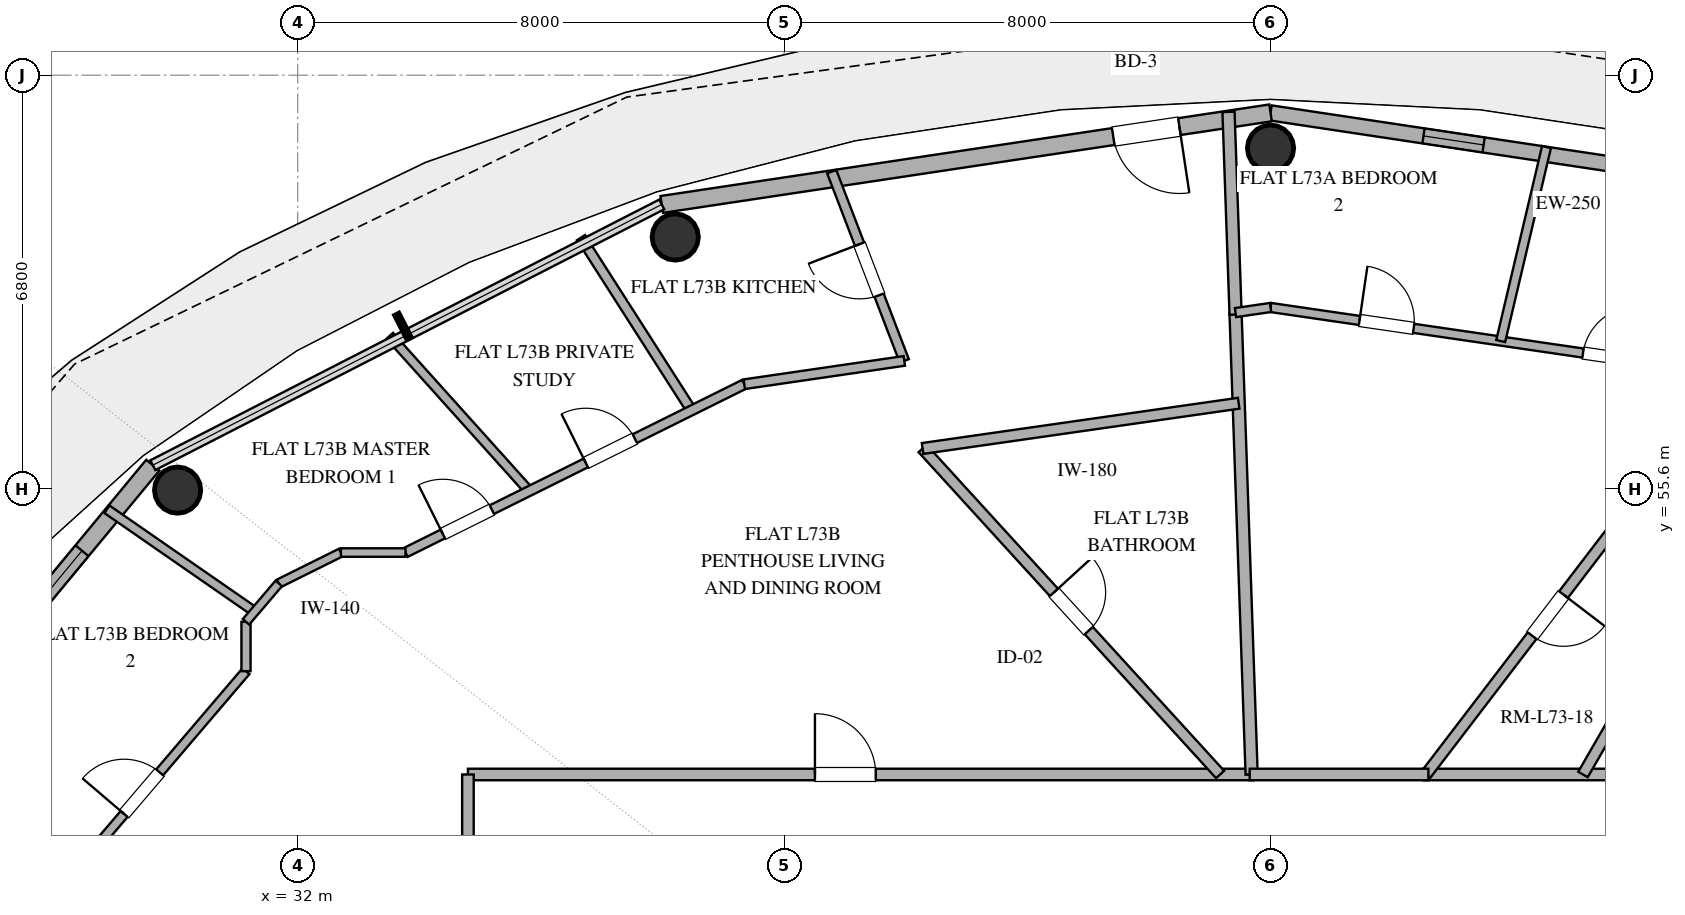
"""IFC4 building model, lengths in metres.
Left out: names, types, materials, properties, quantities, classifications, styles, units other than length and angle.
Written with IfcOpenShell. Run it as: python <this file> out.ifc"""

import sys

from ifc_helpers import new_model, si_unit, direction, frame, frame_2d, origin, origin_2d, place, context, subcontext, project, spatial, rectangle, hollow_circle, extrude, element, fill, save


model = new_model("IFC4")
c1 = context("Model", 3, precision=1e-05, world=origin(), true_north=direction((0.0, 1.0)))
c2 = subcontext(c1, "Body", "Model", "MODEL_VIEW")
j1 = project(units=[si_unit("LENGTHUNIT", "METRE"), si_unit("PLANEANGLEUNIT", "RADIAN")], contexts=[c1])
p1 = place(None, origin())
s1 = spatial("IfcSite", under=j1, at=p1, CompositionType="ELEMENT")
p2 = place(p1, origin())
s2 = spatial("IfcBuilding", under=s1, at=p2, CompositionType="ELEMENT")
p3 = place(p2, frame((0.0, 0.0, 283.8)))
s3 = spatial("IfcBuildingStorey", under=s2, at=p3, CompositionType="ELEMENT", Elevation=283.8)
for number, where, z_axis, x_axis in (
    (1, (48.0, 61.2, 0.0), (0.0, 0.0, 1.0), (1.0, 0.0, 0.0)),
    (2, (38.209, 59.739, 0.0), (0.0, 0.0, 1.0), (1.0, 0.0, 0.0)),
    (3, (30.025, 55.576, 0.0), (0.0, 0.0, 1.0), (1.0, 0.0, 0.0)),
):
    element("IfcColumn", number, at=place(p3, frame(where, z_axis=z_axis, x_axis=x_axis)), inside=s3, PredefinedType="COLUMN", context=c2, shape_type="SweptSolid", body=[
        extrude(hollow_circle(Radius=0.381, WallThickness=0.025, at=origin_2d()), origin(), (0.0, 0.0, 1.0), 3.37),
    ])
p4 = place(p3, frame((58.013, 60.274, 0.0), z_axis=(0.0, 0.0, 1.0), x_axis=(-0.988882522213, 0.148698881169, 0.0)))
e4 = element("IfcWall", 4, at=p4, inside=s3, PredefinedType="SOLIDWALL", context=c2, shape_type="SweptSolid", body=[
    extrude(rectangle(XDim=10.125, YDim=0.25, at=frame_2d((5.062, 0.0))), origin(), (0.0, 0.0, 1.0), 3.37),
])
p5 = place(p4, frame((2.134, 0.0, 0.35)))
e5 = element("IfcOpeningElement", 5, at=p5, cuts=e4, PredefinedType="OPENING", context=c2, shape_type="SweptSolid", body=[
    extrude(rectangle(XDim=1.0, YDim=1.05, at=frame_2d((0.5, 0.525))), frame((0.0, 0.135, 0.0), z_axis=(0.0, -1.0, 0.0), x_axis=(1.0, 0.0, 0.0)), (0.0, 0.0, 1.0), 0.27),
])
p6 = place(p4, frame((6.582, 0.0, 1.42)))
e6 = element("IfcOpeningElement", 6, at=p6, cuts=e4, PredefinedType="OPENING", context=c2, shape_type="SweptSolid", body=[
    extrude(rectangle(XDim=1.0, YDim=1.05, at=frame_2d((0.5, 0.525))), frame((0.0, 0.135, 0.0), z_axis=(0.0, -1.0, 0.0), x_axis=(1.0, 0.0, 0.0)), (0.0, 0.0, 1.0), 0.27),
])
p7 = place(p3, frame((48.0, 61.78, 0.0), z_axis=(0.0, 0.0, 1.0), x_axis=(-0.988882522213, -0.148698881169, 0.0)))
e7 = element("IfcWall", 7, at=p7, inside=s3, PredefinedType="SOLIDWALL", context=c2, shape_type="SweptSolid", body=[
    extrude(rectangle(XDim=10.125, YDim=0.28, at=frame_2d((5.062, 0.0))), origin(), (0.0, 0.0, 1.0), 3.37),
])
p8 = place(p7, frame((1.516, 0.0, 0.0)))
e8 = element("IfcOpeningElement", 8, at=p8, cuts=e7, PredefinedType="OPENING", context=c2, shape_type="SweptSolid", body=[
    extrude(rectangle(XDim=1.1, YDim=2.25, at=frame_2d((0.55, 1.125))), frame((0.0, 0.15, 0.0), z_axis=(0.0, -1.0, 0.0), x_axis=(1.0, 0.0, 0.0)), (0.0, 0.0, 1.0), 0.3),
])
p9 = place(p3, frame((29.617, 55.987, 0.0), z_axis=(0.0, 0.0, 1.0), x_axis=(-0.63761509934, -0.770355103243, 0.0)))
e9 = element("IfcWall", 9, at=p9, inside=s3, PredefinedType="SOLIDWALL", context=c2, shape_type="SweptSolid", body=[
    extrude(rectangle(XDim=8.33, YDim=0.28, at=frame_2d((4.165, 0.0))), origin(), (0.0, 0.0, 1.0), 3.37),
])
p10 = place(p9, frame((1.826, 0.0, 0.85)))
e10 = element("IfcOpeningElement", 10, at=p10, cuts=e9, PredefinedType="OPENING", context=c2, shape_type="SweptSolid", body=[
    extrude(rectangle(XDim=2.1, YDim=2.2, at=frame_2d((1.05, 1.1))), frame((0.0, 0.15, 0.0), z_axis=(0.0, -1.0, 0.0), x_axis=(1.0, 0.0, 0.0)), (0.0, 0.0, 1.0), 0.3),
])
p11 = place(p9, frame((4.296, 0.0, 0.85)))
e11 = element("IfcOpeningElement", 11, at=p11, cuts=e9, PredefinedType="OPENING", context=c2, shape_type="SweptSolid", body=[
    extrude(rectangle(XDim=2.1, YDim=2.2, at=frame_2d((1.05, 1.1))), frame((0.0, 0.15, 0.0), z_axis=(0.0, -1.0, 0.0), x_axis=(1.0, 0.0, 0.0)), (0.0, 0.0, 1.0), 0.3),
])
p12 = place(p3, frame((34.8, 50.9, 0.0), z_axis=(0.0, 0.0, 1.0), x_axis=(1.0, 0.0, 0.0)))
e12 = element("IfcWall", 12, at=p12, inside=s3, PredefinedType="PARTITIONING", context=c2, shape_type="SweptSolid", body=[
    extrude(rectangle(XDim=12.921, YDim=0.19, at=frame_2d((6.46, 0.0))), origin(), (0.0, 0.0, 1.0), 2.73),
])
p13 = place(p12, frame((5.707, 0.0, 0.0)))
e13 = element("IfcOpeningElement", 13, at=p13, cuts=e12, PredefinedType="OPENING", context=c2, shape_type="SweptSolid", body=[
    extrude(rectangle(XDim=1.0, YDim=2.2, at=frame_2d((0.5, 1.1))), frame((0.0, 0.105, 0.0), z_axis=(0.0, -1.0, 0.0), x_axis=(1.0, 0.0, 0.0)), (0.0, 0.0, 1.0), 0.21),
])
p14 = place(p3, frame((34.8, 34.0, 0.0), z_axis=(0.0, 0.0, 1.0), x_axis=(0.0, 1.0, 0.0)))
e14 = element("IfcWall", 14, at=p14, inside=s3, PredefinedType="PARTITIONING", context=c2, shape_type="SweptSolid", body=[
    extrude(rectangle(XDim=16.9, YDim=0.19, at=frame_2d((8.45, 0.0))), origin(), (0.0, 0.0, 1.0), 2.73),
])
p15 = place(p14, frame((7.627, 0.0, 0.0)))
e15 = element("IfcOpeningElement", 15, at=p15, cuts=e14, PredefinedType="OPENING", context=c2, shape_type="SweptSolid", body=[
    extrude(rectangle(XDim=1.0, YDim=2.2, at=frame_2d((0.5, 1.1))), frame((0.0, 0.105, 0.0), z_axis=(0.0, -1.0, 0.0), x_axis=(1.0, 0.0, 0.0)), (0.0, 0.0, 1.0), 0.21),
])
p16 = place(p3, frame((50.515, 50.9, 0.0), z_axis=(0.0, 0.0, 1.0), x_axis=(1.0, 0.0, 0.0)))
e16 = element("IfcWall", 16, at=p16, inside=s3, PredefinedType="PARTITIONING", context=c2, shape_type="SweptSolid", body=[
    extrude(rectangle(XDim=10.685, YDim=0.19, at=frame_2d((5.342, 0.0))), origin(), (0.0, 0.0, 1.0), 2.73),
])
p17 = place(p16, frame((6.135, 0.0, 0.0)))
e17 = element("IfcOpeningElement", 17, at=p17, cuts=e16, PredefinedType="OPENING", context=c2, shape_type="SweptSolid", body=[
    extrude(rectangle(XDim=1.0, YDim=2.2, at=frame_2d((0.5, 1.1))), frame((0.0, 0.105, 0.0), z_axis=(0.0, -1.0, 0.0), x_axis=(1.0, 0.0, 0.0)), (0.0, 0.0, 1.0), 0.21),
])
p18 = place(p3, frame((42.278, 56.261, 0.0), z_axis=(0.0, 0.0, 1.0), x_axis=(0.674096276867, -0.73864349284, 0.0)))
e18 = element("IfcWall", 18, at=p18, inside=s3, PredefinedType="PLUMBINGWALL", context=c2, shape_type="SweptSolid", body=[
    extrude(rectangle(XDim=7.258, YDim=0.18, at=frame_2d((3.629, 0.0))), origin(), (0.0, 0.0, 1.0), 2.73),
])
p19 = place(p18, frame((3.204, 0.0, 0.0)))
e19 = element("IfcOpeningElement", 19, at=p19, cuts=e18, PredefinedType="OPENING", context=c2, shape_type="SweptSolid", body=[
    extrude(rectangle(XDim=0.85, YDim=2.1, at=frame_2d((0.425, 1.05))), frame((0.0, 0.1, 0.0), z_axis=(0.0, -1.0, 0.0), x_axis=(1.0, 0.0, 0.0)), (0.0, 0.0, 1.0), 0.2),
])
p20 = place(p3, frame((54.564, 56.141, 0.0), z_axis=(0.0, 0.0, 1.0), x_axis=(-0.607456974677, -0.794352581614, 0.0)))
e20 = element("IfcWall", 20, at=p20, inside=s3, PredefinedType="PLUMBINGWALL", context=c2, shape_type="SweptSolid", body=[
    extrude(rectangle(XDim=6.598, YDim=0.18, at=frame_2d((3.299, 0.0))), origin(), (0.0, 0.0, 1.0), 2.73),
])
p21 = place(p20, frame((2.874, 0.0, 0.0)))
e21 = element("IfcOpeningElement", 21, at=p21, cuts=e20, PredefinedType="OPENING", context=c2, shape_type="SweptSolid", body=[
    extrude(rectangle(XDim=0.85, YDim=2.1, at=frame_2d((0.425, 1.05))), frame((0.0, 0.1, 0.0), z_axis=(0.0, -1.0, 0.0), x_axis=(1.0, 0.0, 0.0)), (0.0, 0.0, 1.0), 0.2),
])
p22 = place(p3, frame((47.689, 50.9, 0.0), z_axis=(0.0, 0.0, 1.0), x_axis=(-0.034882659784, 0.999391414835, 0.0)))
e22 = element("IfcWall", 22, at=p22, inside=s3, PredefinedType="PARTITIONING", context=c2, shape_type="SweptSolid", body=[
    extrude(rectangle(XDim=7.601, YDim=0.2, at=frame_2d((3.8, 0.0))), origin(), (0.0, 0.0, 1.0), 2.73),
])
p23 = place(p3, frame((53.138, 50.9, 0.0), z_axis=(0.0, 0.0, 1.0), x_axis=(0.499985927882, 0.866033528173, 0.0)))
e23 = element("IfcWall", 23, at=p23, inside=s3, PredefinedType="PLUMBINGWALL", context=c2, shape_type="SweptSolid", body=[
    extrude(rectangle(XDim=5.802, YDim=0.18, at=frame_2d((2.901, 0.0))), origin(), (0.0, 0.0, 1.0), 2.73),
])
p24 = place(p3, frame((27.726, 48.587, 0.0), z_axis=(0.0, 0.0, 1.0), x_axis=(0.649196412447, 0.760620810961, 0.0)))
e24 = element("IfcWall", 24, at=p24, inside=s3, PredefinedType="PARTITIONING", context=c2, shape_type="SweptSolid", body=[
    extrude(rectangle(XDim=5.274, YDim=0.15, at=frame_2d((2.637, 0.0))), origin(), (0.0, 0.0, 1.0), 2.73),
])
p25 = place(p24, frame((2.187, 0.0, 0.0)))
e25 = element("IfcOpeningElement", 25, at=p25, cuts=e24, PredefinedType="OPENING", context=c2, shape_type="SweptSolid", body=[
    extrude(rectangle(XDim=0.9, YDim=2.1, at=frame_2d((0.45, 1.05))), frame((0.0, 0.085, 0.0), z_axis=(0.0, -1.0, 0.0), x_axis=(1.0, 0.0, 0.0)), (0.0, 0.0, 1.0), 0.17),
])
p26 = place(p3, frame((47.476, 57.005, 0.0), z_axis=(0.0, 0.0, 1.0), x_axis=(-0.989922511169, -0.141610105153, 0.0)))
e26 = element("IfcWall", 26, at=p26, inside=s3, PredefinedType="PLUMBINGWALL", context=c2, shape_type="SweptSolid", body=[
    extrude(rectangle(XDim=5.251, YDim=0.18, at=frame_2d((2.626, 0.0))), origin(), (0.0, 0.0, 1.0), 2.73),
])
p27 = place(p3, frame((48.0, 58.58, 0.0), z_axis=(0.0, 0.0, 1.0), x_axis=(0.989536136377, -0.144285254977, 0.0)))
e27 = element("IfcWall", 27, at=p27, inside=s3, PredefinedType="PARTITIONING", context=c2, shape_type="SweptSolid", body=[
    extrude(rectangle(XDim=8.746, YDim=0.15, at=frame_2d((4.373, 0.0))), origin(), (0.0, 0.0, 1.0), 2.73),
])
p28 = place(p27, frame((1.479, 0.0, 0.0)))
e28 = element("IfcOpeningElement", 28, at=p28, cuts=e27, PredefinedType="OPENING", context=c2, shape_type="SweptSolid", body=[
    extrude(rectangle(XDim=0.9, YDim=2.1, at=frame_2d((0.45, 1.05))), frame((0.0, 0.085, 0.0), z_axis=(0.0, -1.0, 0.0), x_axis=(1.0, 0.0, 0.0)), (0.0, 0.0, 1.0), 0.17),
])
p29 = place(p27, frame((5.193, 0.0, 0.0)))
e29 = element("IfcOpeningElement", 29, at=p29, cuts=e27, PredefinedType="OPENING", context=c2, shape_type="SweptSolid", body=[
    extrude(rectangle(XDim=0.9, YDim=2.1, at=frame_2d((0.45, 1.05))), frame((0.0, 0.085, 0.0), z_axis=(0.0, -1.0, 0.0), x_axis=(1.0, 0.0, 0.0)), (0.0, 0.0, 1.0), 0.17),
])
p30 = place(p3, frame((35.807, 55.561, 0.0), z_axis=(0.0, 0.0, 1.0), x_axis=(-0.668618761853, 0.743605373365, 0.0)))
e30 = element("IfcWall", 30, at=p30, inside=s3, PredefinedType="PARTITIONING", context=c2, shape_type="SweptSolid", body=[
    extrude(rectangle(XDim=3.432, YDim=0.15, at=frame_2d((1.716, 0.0))), origin(), (0.0, 0.0, 1.0), 2.73),
])
p31 = place(p3, frame((38.477, 56.887, 0.0), z_axis=(0.0, 0.0, 1.0), x_axis=(-0.538850350107, 0.842401507709, 0.0)))
e31 = element("IfcWall", 31, at=p31, inside=s3, PredefinedType="PLUMBINGWALL", context=c2, shape_type="SweptSolid", body=[
    extrude(rectangle(XDim=3.373, YDim=0.16, at=frame_2d((1.687, 0.0))), origin(), (0.0, 0.0, 1.0), 2.73),
])
p32 = place(p3, frame((47.309, 61.797, 0.0), z_axis=(0.0, 0.0, 1.0), x_axis=(0.034921182562, -0.999390069497, 0.0)))
e32 = element("IfcWall", 32, at=p32, inside=s3, PredefinedType="PARTITIONING", context=c2, shape_type="SweptSolid", body=[
    extrude(rectangle(XDim=3.335, YDim=0.2, at=frame_2d((1.667, 0.0))), origin(), (0.0, 0.0, 1.0), 2.73),
])
p33 = place(p3, frame((41.977, 57.702, 0.0), z_axis=(0.0, 0.0, 1.0), x_axis=(-0.358154229758, 0.933662437772, 0.0)))
e33 = element("IfcWall", 33, at=p33, inside=s3, PredefinedType="PLUMBINGWALL", context=c2, shape_type="SweptSolid", body=[
    extrude(rectangle(XDim=3.333, YDim=0.16, at=frame_2d((1.667, 0.0))), origin(), (0.0, 0.0, 1.0), 2.73),
])
p34 = place(p33, frame((1.156, 0.0, 0.0)))
e34 = element("IfcOpeningElement", 34, at=p34, cuts=e33, PredefinedType="OPENING", context=c2, shape_type="SweptSolid", body=[
    extrude(rectangle(XDim=0.9, YDim=2.1, at=frame_2d((0.45, 1.05))), frame((0.0, 0.09, 0.0), z_axis=(0.0, -1.0, 0.0), x_axis=(1.0, 0.0, 0.0)), (0.0, 0.0, 1.0), 0.18),
])
p35 = place(p3, frame((51.785, 58.028, 0.0), z_axis=(0.0, 0.0, 1.0), x_axis=(0.2298279545, 0.973231273301, 0.0)))
e35 = element("IfcWall", 35, at=p35, inside=s3, PredefinedType="PARTITIONING", context=c2, shape_type="SweptSolid", body=[
    extrude(rectangle(XDim=3.278, YDim=0.15, at=frame_2d((1.639, 0.0))), origin(), (0.0, 0.0, 1.0), 2.73),
])
p36 = place(p3, frame((33.773, 54.55, 0.0), z_axis=(0.0, 0.0, 1.0), x_axis=(0.895562239868, 0.444936258943, 0.0)))
e36 = element("IfcWall", 36, at=p36, inside=s3, PredefinedType="PLUMBINGWALL", context=c2, shape_type="SweptSolid", body=[
    extrude(rectangle(XDim=6.222, YDim=0.16, at=frame_2d((3.111, 0.0))), origin(), (0.0, 0.0, 1.0), 2.73),
])
p37 = place(p36, frame((3.311, 0.0, 0.0)))
e37 = element("IfcOpeningElement", 37, at=p37, cuts=e36, PredefinedType="OPENING", context=c2, shape_type="SweptSolid", body=[
    extrude(rectangle(XDim=0.9, YDim=2.1, at=frame_2d((0.45, 1.05))), frame((0.0, 0.09, 0.0), z_axis=(0.0, -1.0, 0.0), x_axis=(1.0, 0.0, 0.0)), (0.0, 0.0, 1.0), 0.18),
])
p38 = place(p36, frame((0.686, 0.0, 0.0)))
e38 = element("IfcOpeningElement", 38, at=p38, cuts=e36, PredefinedType="OPENING", context=c2, shape_type="SweptSolid", body=[
    extrude(rectangle(XDim=0.9, YDim=2.1, at=frame_2d((0.45, 1.05))), frame((0.0, 0.09, 0.0), z_axis=(0.0, -1.0, 0.0), x_axis=(1.0, 0.0, 0.0)), (0.0, 0.0, 1.0), 0.18),
])
p39 = place(p3, frame((31.293, 53.578, 0.0), z_axis=(0.0, 0.0, 1.0), x_axis=(-0.821957300328, 0.569549116792, 0.0)))
e39 = element("IfcWall", 39, at=p39, inside=s3, PredefinedType="PARTITIONING", context=c2, shape_type="SweptSolid", body=[
    extrude(rectangle(XDim=2.957, YDim=0.15, at=frame_2d((1.479, 0.0))), origin(), (0.0, 0.0, 1.0), 2.73),
])
p40 = place(p3, frame((47.657, 50.9, 0.0), z_axis=(0.0, 0.0, 1.0), x_axis=(1.0, 0.0, 0.0)))
e40 = element("IfcWall", 40, at=p40, inside=s3, PredefinedType="PARTITIONING", context=c2, shape_type="SweptSolid", body=[
    extrude(rectangle(XDim=2.939, YDim=0.19, at=frame_2d((1.469, 0.0))), origin(), (0.0, 0.0, 1.0), 2.73),
])
p41 = place(p3, frame((39.345, 57.318, 0.0), z_axis=(0.0, 0.0, 1.0), x_axis=(0.989530249601, 0.144325621857, 0.0)))
e41 = element("IfcWall", 41, at=p41, inside=s3, PredefinedType="PLUMBINGWALL", context=c2, shape_type="SweptSolid", body=[
    extrude(rectangle(XDim=2.659, YDim=0.16, at=frame_2d((1.33, 0.0))), origin(), (0.0, 0.0, 1.0), 2.73),
])
p42 = place(p3, frame((32.711, 54.55, 0.0), z_axis=(0.0, 0.0, 1.0), x_axis=(-0.895409226325, -0.445244109912, 0.0)))
e42 = element("IfcWall", 42, at=p42, inside=s3, PredefinedType="PARTITIONING", context=c2, shape_type="SweptSolid", body=[
    extrude(rectangle(XDim=1.141, YDim=0.14, at=frame_2d((0.571, 0.0))), origin(), (0.0, 0.0, 1.0), 2.73),
])
p43 = place(p3, frame((33.773, 54.55, 0.0), z_axis=(0.0, 0.0, 1.0), x_axis=(-1.0, 0.0, 0.0)))
e43 = element("IfcWall", 43, at=p43, inside=s3, PredefinedType="PARTITIONING", context=c2, shape_type="SweptSolid", body=[
    extrude(rectangle(XDim=1.062, YDim=0.14, at=frame_2d((0.531, 0.0))), origin(), (0.0, 0.0, 1.0), 2.73),
])
p44 = place(p3, frame((31.15, 52.599, 0.0), z_axis=(0.0, 0.0, 1.0), x_axis=(0.0, 1.0, 0.0)))
e44 = element("IfcWall", 44, at=p44, inside=s3, PredefinedType="PARTITIONING", context=c2, shape_type="SweptSolid", body=[
    extrude(rectangle(XDim=0.812, YDim=0.15, at=frame_2d((0.406, 0.0))), origin(), (0.0, 0.0, 1.0), 2.73),
])
p45 = place(p3, frame((31.689, 54.042, 0.0), z_axis=(0.0, 0.0, 1.0), x_axis=(-0.649191857323, -0.760624698774, 0.0)))
e45 = element("IfcWall", 45, at=p45, inside=s3, PredefinedType="PARTITIONING", context=c2, shape_type="SweptSolid", body=[
    extrude(rectangle(XDim=0.83, YDim=0.14, at=frame_2d((0.415, 0.0))), origin(), (0.0, 0.0, 1.0), 2.73),
])
p46 = place(p3, frame((47.424, 58.496, 0.0), z_axis=(0.0, 0.0, 1.0), x_axis=(0.989534228924, 0.144298336053, 0.0)))
e46 = element("IfcWall", 46, at=p46, inside=s3, PredefinedType="PARTITIONING", context=c2, shape_type="SweptSolid", body=[
    extrude(rectangle(XDim=0.582, YDim=0.15, at=frame_2d((0.291, 0.0))), origin(), (0.0, 0.0, 1.0), 2.73),
])
p47 = place(p8, origin())
e47 = element("IfcDoor", 47, at=p47, inside=s3, OperationType="SINGLE_SWING_LEFT", PredefinedType="DOOR", context=c2, shape_type="SweptSolid", body=[
    extrude(rectangle(XDim=1.1, YDim=2.25, at=frame_2d((0.55, 1.125))), frame((0.0, 0.025, 0.0), z_axis=(0.0, -1.0, 0.0), x_axis=(1.0, 0.0, 0.0)), (0.0, 0.0, 1.0), 0.05),
])
fill(e8, e47)
p48 = place(p10, origin())
e48 = element("IfcWindow", 48, at=p48, inside=s3, PartitioningType="SINGLE_PANEL", PredefinedType="WINDOW", context=c2, shape_type="SweptSolid", body=[
    extrude(rectangle(XDim=2.1, YDim=2.2, at=frame_2d((1.05, 1.1))), frame((0.0, 0.03, 0.0), z_axis=(0.0, -1.0, 0.0), x_axis=(1.0, 0.0, 0.0)), (0.0, 0.0, 1.0), 0.06),
])
fill(e10, e48)
p49 = place(p6, origin())
e49 = element("IfcWindow", 49, at=p49, inside=s3, PartitioningType="SINGLE_PANEL", PredefinedType="WINDOW", context=c2, shape_type="SweptSolid", body=[
    extrude(rectangle(XDim=1.0, YDim=1.05, at=frame_2d((0.5, 0.525))), frame((0.0, 0.03, 0.0), z_axis=(0.0, -1.0, 0.0), x_axis=(1.0, 0.0, 0.0)), (0.0, 0.0, 1.0), 0.06),
])
fill(e6, e49)
p50 = place(p13, origin())
e50 = element("IfcDoor", 50, at=p50, inside=s3, OperationType="SINGLE_SWING_LEFT", PredefinedType="DOOR", context=c2, shape_type="SweptSolid", body=[
    extrude(rectangle(XDim=1.0, YDim=2.2, at=frame_2d((0.5, 1.1))), frame((0.0, 0.025, 0.0), z_axis=(0.0, -1.0, 0.0), x_axis=(1.0, 0.0, 0.0)), (0.0, 0.0, 1.0), 0.05),
])
fill(e13, e50)
p51 = place(p19, origin())
e51 = element("IfcDoor", 51, at=p51, inside=s3, OperationType="SINGLE_SWING_LEFT", PredefinedType="DOOR", context=c2, shape_type="SweptSolid", body=[
    extrude(rectangle(XDim=0.85, YDim=2.1, at=frame_2d((0.425, 1.05))), frame((0.0, 0.025, 0.0), z_axis=(0.0, -1.0, 0.0), x_axis=(1.0, 0.0, 0.0)), (0.0, 0.0, 1.0), 0.05),
])
fill(e19, e51)
p52 = place(p21, origin())
e52 = element("IfcDoor", 52, at=p52, inside=s3, OperationType="SINGLE_SWING_LEFT", PredefinedType="DOOR", context=c2, shape_type="SweptSolid", body=[
    extrude(rectangle(XDim=0.85, YDim=2.1, at=frame_2d((0.425, 1.05))), frame((0.0, 0.025, 0.0), z_axis=(0.0, -1.0, 0.0), x_axis=(1.0, 0.0, 0.0)), (0.0, 0.0, 1.0), 0.05),
])
fill(e21, e52)
p53 = place(p25, origin())
e53 = element("IfcDoor", 53, at=p53, inside=s3, OperationType="SINGLE_SWING_LEFT", PredefinedType="DOOR", context=c2, shape_type="SweptSolid", body=[
    extrude(rectangle(XDim=0.9, YDim=2.1, at=frame_2d((0.45, 1.05))), frame((0.0, 0.025, 0.0), z_axis=(0.0, -1.0, 0.0), x_axis=(1.0, 0.0, 0.0)), (0.0, 0.0, 1.0), 0.05),
])
fill(e25, e53)
p54 = place(p28, origin())
e54 = element("IfcDoor", 54, at=p54, inside=s3, OperationType="SINGLE_SWING_LEFT", PredefinedType="DOOR", context=c2, shape_type="SweptSolid", body=[
    extrude(rectangle(XDim=0.9, YDim=2.1, at=frame_2d((0.45, 1.05))), frame((0.0, 0.025, 0.0), z_axis=(0.0, -1.0, 0.0), x_axis=(1.0, 0.0, 0.0)), (0.0, 0.0, 1.0), 0.05),
])
fill(e28, e54)
p55 = place(p29, origin())
e55 = element("IfcDoor", 55, at=p55, inside=s3, OperationType="SINGLE_SWING_RIGHT", PredefinedType="DOOR", context=c2, shape_type="SweptSolid", body=[
    extrude(rectangle(XDim=0.9, YDim=2.1, at=frame_2d((0.45, 1.05))), frame((0.0, 0.025, 0.0), z_axis=(0.0, -1.0, 0.0), x_axis=(1.0, 0.0, 0.0)), (0.0, 0.0, 1.0), 0.05),
])
fill(e29, e55)
p56 = place(p34, origin())
e56 = element("IfcDoor", 56, at=p56, inside=s3, OperationType="SINGLE_SWING_RIGHT", PredefinedType="DOOR", context=c2, shape_type="SweptSolid", body=[
    extrude(rectangle(XDim=0.9, YDim=2.1, at=frame_2d((0.45, 1.05))), frame((0.0, 0.025, 0.0), z_axis=(0.0, -1.0, 0.0), x_axis=(1.0, 0.0, 0.0)), (0.0, 0.0, 1.0), 0.05),
])
fill(e34, e56)
p57 = place(p37, origin())
e57 = element("IfcDoor", 57, at=p57, inside=s3, OperationType="SINGLE_SWING_LEFT", PredefinedType="DOOR", context=c2, shape_type="SweptSolid", body=[
    extrude(rectangle(XDim=0.9, YDim=2.1, at=frame_2d((0.45, 1.05))), frame((0.0, 0.025, 0.0), z_axis=(0.0, -1.0, 0.0), x_axis=(1.0, 0.0, 0.0)), (0.0, 0.0, 1.0), 0.05),
])
fill(e37, e57)
p58 = place(p38, origin())
e58 = element("IfcDoor", 58, at=p58, inside=s3, OperationType="SINGLE_SWING_LEFT", PredefinedType="DOOR", context=c2, shape_type="SweptSolid", body=[
    extrude(rectangle(XDim=0.9, YDim=2.1, at=frame_2d((0.45, 1.05))), frame((0.0, 0.025, 0.0), z_axis=(0.0, -1.0, 0.0), x_axis=(1.0, 0.0, 0.0)), (0.0, 0.0, 1.0), 0.05),
])
fill(e38, e58)
save(model, sys.argv[1])
